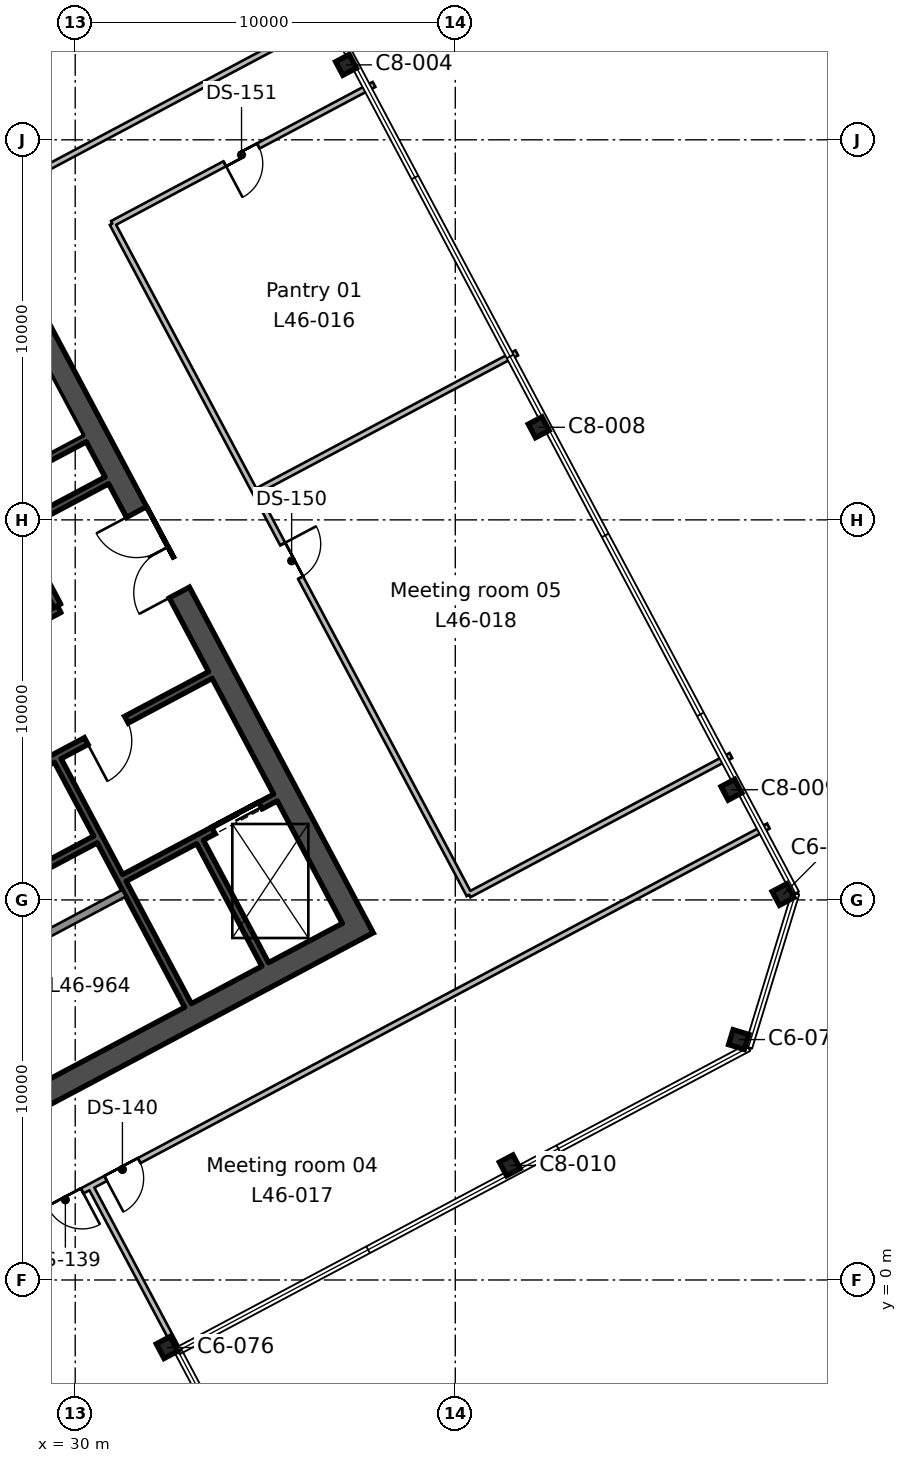
"""IFC4 building model, lengths in metres.
Left out: names, types, materials, properties, quantities, classifications, styles, units other than length and angle.
Written with IfcOpenShell. Run it as: python <this file> out.ifc"""

import sys

from ifc_helpers import new_model, si_unit, direction, frame, frame_2d, origin, origin_2d, place, context, subcontext, project, spatial, rectangle, i_section, extrude, element, fill, save


model = new_model("IFC4")
c1 = context("Model", 3, precision=1e-05, world=origin(), true_north=direction((0.0, 1.0)))
c2 = subcontext(c1, "Body", "Model", "MODEL_VIEW")
j1 = project(units=[si_unit("LENGTHUNIT", "METRE"), si_unit("PLANEANGLEUNIT", "RADIAN")], contexts=[c1])
p1 = place(None, origin())
s1 = spatial("IfcSite", under=j1, at=p1, CompositionType="ELEMENT")
p2 = place(p1, origin())
s2 = spatial("IfcBuilding", under=s1, at=p2, CompositionType="ELEMENT")
p3 = place(p2, frame((0.0, 0.0, 213.0)))
s3 = spatial("IfcBuildingStorey", under=s2, at=p3, CompositionType="ELEMENT", Elevation=213.0)
p4 = place(p3, frame((32.417, -1.777, 0.0), z_axis=(0.0, 0.0, 1.0), x_axis=(0.882947592859, 0.469471562786, 0.0)))
e1 = element("IfcColumn", 1, at=p4, inside=s3, PredefinedType="COLUMN", context=c2, shape_type="SweptSolid", body=[
    extrude(i_section(OverallWidth=0.412, OverallDepth=0.434, WebThickness=0.036, FlangeThickness=0.057, FilletRadius=0.015, at=origin_2d()), origin(), (0.0, 0.0, 1.0), 3.9),
])
p5 = place(p3, frame((41.434, 3.015, 0.0), z_axis=(0.0, 0.0, 1.0), x_axis=(0.882947592859, 0.469471562786, 0.0)))
e2 = element("IfcColumn", 2, at=p5, inside=s3, PredefinedType="COLUMN", context=c2, shape_type="SweptSolid", body=[
    extrude(i_section(OverallWidth=0.404, OverallDepth=0.406, WebThickness=0.027, FlangeThickness=0.044, FilletRadius=0.015, at=origin_2d()), origin(), (0.0, 0.0, 1.0), 3.9),
])
for number, where, z_axis, x_axis in (
    (3, (47.459, 6.326, 0.0), (0.0, 0.0, 1.0), (0.292, 0.956, 0.0)),
    (4, (48.626, 10.142, 0.0), (0.0, 0.0, 1.0), (-0.469, 0.883, 0.0)),
):
    element("IfcColumn", number, at=place(p3, frame(where, z_axis=z_axis, x_axis=x_axis)), inside=s3, PredefinedType="COLUMN", context=c2, shape_type="SweptSolid", body=[
        extrude(i_section(OverallWidth=0.412, OverallDepth=0.434, WebThickness=0.036, FlangeThickness=0.057, FilletRadius=0.015, at=origin_2d()), origin(), (0.0, 0.0, 1.0), 3.9),
    ])
for number, where, z_axis, x_axis in (
    (5, (47.266, 12.9, 0.0), (0.0, 0.0, 1.0), (-0.469, 0.883, 0.0)),
    (6, (42.196, 22.436, 0.0), (0.0, 0.0, 1.0), (-0.469, 0.883, 0.0)),
    (7, (37.126, 31.972, 0.0), (0.0, 0.0, 1.0), (-0.469, 0.883, 0.0)),
):
    element("IfcColumn", number, at=place(p3, frame(where, z_axis=z_axis, x_axis=x_axis)), inside=s3, PredefinedType="COLUMN", context=c2, shape_type="SweptSolid", body=[
        extrude(i_section(OverallWidth=0.404, OverallDepth=0.406, WebThickness=0.027, FlangeThickness=0.044, FilletRadius=0.015, at=origin_2d()), origin(), (0.0, 0.0, 1.0), 3.9),
    ])
p6 = place(p3, frame((37.576, 8.994, 0.0), z_axis=(0.0, 0.0, 1.0), x_axis=(-0.469478769487, 0.88294376095, 0.0)))
e8 = element("IfcWall", 8, at=p6, inside=s3, PredefinedType="SHEAR", context=c2, shape_type="SweptSolid", body=[
    extrude(rectangle(XDim=19.4, YDim=0.6, at=frame_2d((9.7, 0.0))), origin(), (0.0, 0.0, 1.0), 3.9),
])
p7 = place(p6, frame((10.3, 0.0, 0.0)))
e9 = element("IfcOpeningElement", 9, at=p7, cuts=e8, PredefinedType="OPENING", context=c2, shape_type="SweptSolid", body=[
    extrude(rectangle(XDim=2.4, YDim=2.4, at=frame_2d((1.2, 1.2))), frame((0.0, 0.31, 0.0), z_axis=(0.0, -1.0, 0.0), x_axis=(1.0, 0.0, 0.0)), (0.0, 0.0, 1.0), 0.62),
])
p8 = place(p3, frame((19.335, -0.366, 0.0), z_axis=(0.0, 0.0, 1.0), x_axis=(0.88294509198, 0.469476266226, 0.0)))
e10 = element("IfcWall", 10, at=p8, inside=s3, PredefinedType="SHEAR", context=c2, shape_type="SweptSolid", body=[
    extrude(rectangle(XDim=20.2, YDim=0.6, at=frame_2d((10.1, 0.0))), origin(), (0.0, 0.0, 1.0), 3.9),
])
p9 = place(p3, frame((32.968, 7.223, 0.0), z_axis=(0.0, 0.0, 1.0), x_axis=(-0.469480409012, 0.88294288918, 0.0)))
e11 = element("IfcWall", 11, at=p9, inside=s3, PredefinedType="SHEAR", context=c2, shape_type="SweptSolid", body=[
    extrude(rectangle(XDim=7.3, YDim=0.2, at=frame_2d((3.65, 0.0))), origin(), (0.0, 0.0, 1.0), 3.9),
])
p10 = place(p3, frame((29.528, 17.739, 0.0), z_axis=(0.0, 0.0, 1.0), x_axis=(-0.469401318492, 0.882984938828, 0.0)))
e12 = element("IfcWall", 12, at=p10, inside=s3, PredefinedType="SHEAR", context=c2, shape_type="SweptSolid", body=[
    extrude(rectangle(XDim=2.2, YDim=0.2, at=frame_2d((1.1, 0.0))), origin(), (0.0, 0.0, 1.0), 3.9),
])
p11 = place(p3, frame((34.999, 8.303, 0.0), z_axis=(0.0, 0.0, 1.0), x_axis=(-0.4694665462, 0.882950260207, 0.0)))
e13 = element("IfcWall", 13, at=p11, inside=s3, PredefinedType="SHEAR", context=c2, shape_type="SweptSolid", body=[
    extrude(rectangle(XDim=3.65, YDim=0.2, at=frame_2d((1.825, 0.0))), origin(), (0.0, 0.0, 1.0), 3.9),
])
p12 = place(p3, frame((26.692, 7.737, 0.0), z_axis=(0.0, 0.0, 1.0), x_axis=(0.882953967957, 0.469459572775, 0.0)))
e14 = element("IfcWall", 14, at=p12, inside=s3, PredefinedType="SOLIDWALL", context=c2, shape_type="SweptSolid", body=[
    extrude(rectangle(XDim=5.2, YDim=0.2, at=frame_2d((2.6, 0.0))), origin(), (0.0, 0.0, 1.0), 3.9),
])
p13 = place(p3, frame((31.296, 10.581, 0.0), z_axis=(0.0, 0.0, 1.0), x_axis=(0.882960433586, 0.469447412093, 0.0)))
e15 = element("IfcWall", 15, at=p13, inside=s3, PredefinedType="SHEAR", context=c2, shape_type="SweptSolid", body=[
    extrude(rectangle(XDim=4.5, YDim=0.2, at=frame_2d((2.25, 0.0))), origin(), (0.0, 0.0, 1.0), 3.9),
])
p14 = place(p13, frame((2.65, 0.0, 0.0)))
e16 = element("IfcOpeningElement", 16, at=p14, cuts=e15, PredefinedType="OPENING", context=c2, shape_type="SweptSolid", body=[
    extrude(rectangle(XDim=1.4, YDim=2.4, at=frame_2d((0.7, 1.2))), frame((0.0, 0.11, 0.0), z_axis=(0.0, -1.0, 0.0), x_axis=(1.0, 0.0, 0.0)), (0.0, 0.0, 1.0), 0.22),
])
p15 = place(p3, frame((25.941, 9.15, 0.0), z_axis=(0.0, 0.0, 1.0), x_axis=(0.882953967957, 0.469459572775, 0.0)))
e17 = element("IfcWall", 17, at=p15, inside=s3, PredefinedType="SHEAR", context=c2, shape_type="SweptSolid", body=[
    extrude(rectangle(XDim=5.2, YDim=0.2, at=frame_2d((2.6, 0.0))), origin(), (0.0, 0.0, 1.0), 3.9),
])
p16 = place(p3, frame((24.726, 11.222, 0.0), z_axis=(0.0, 0.0, 1.0), x_axis=(0.882940221191, 0.469485426614, 0.0)))
e18 = element("IfcWall", 18, at=p16, inside=s3, PredefinedType="SHEAR", context=c2, shape_type="SweptSolid", body=[
    extrude(rectangle(XDim=10.0, YDim=0.2, at=frame_2d((5.0, 0.0))), origin(), (0.0, 0.0, 1.0), 3.9),
])
p17 = place(p16, frame((6.3, 0.0, 0.0)))
e19 = element("IfcOpeningElement", 19, at=p17, cuts=e18, PredefinedType="OPENING", context=c2, shape_type="SweptSolid", body=[
    extrude(rectangle(XDim=1.2, YDim=2.1, at=frame_2d((0.6, 1.05))), frame((0.0, 0.11, 0.0), z_axis=(0.0, -1.0, 0.0), x_axis=(1.0, 0.0, 0.0)), (0.0, 0.0, 1.0), 0.22),
])
p18 = place(p16, frame((0.36, 0.0, 0.0)))
e20 = element("IfcOpeningElement", 20, at=p18, cuts=e18, PredefinedType="OPENING", context=c2, shape_type="SweptSolid", body=[
    extrude(rectangle(XDim=0.9, YDim=2.1, at=frame_2d((0.45, 1.05))), frame((0.0, 0.11, 0.0), z_axis=(0.0, -1.0, 0.0), x_axis=(1.0, 0.0, 0.0)), (0.0, 0.0, 1.0), 0.22),
])
p19 = place(p16, frame((3.06, 0.0, 0.0)))
e21 = element("IfcOpeningElement", 21, at=p19, cuts=e18, PredefinedType="OPENING", context=c2, shape_type="SweptSolid", body=[
    extrude(rectangle(XDim=0.9, YDim=2.1, at=frame_2d((0.45, 1.05))), frame((0.0, 0.11, 0.0), z_axis=(0.0, -1.0, 0.0), x_axis=(1.0, 0.0, 0.0)), (0.0, 0.0, 1.0), 0.22),
])
p20 = place(p3, frame((24.807, 15.116, 0.0), z_axis=(0.0, 0.0, 1.0), x_axis=(0.882942972946, 0.469480251476, 0.0)))
e22 = element("IfcWall", 22, at=p20, inside=s3, PredefinedType="SHEAR", context=c2, shape_type="SweptSolid", body=[
    extrude(rectangle(XDim=5.4, YDim=0.2, at=frame_2d((2.7, 0.0))), origin(), (0.0, 0.0, 1.0), 3.9),
])
p21 = place(p20, frame((0.36, 0.0, 0.0)))
e23 = element("IfcOpeningElement", 23, at=p21, cuts=e22, PredefinedType="OPENING", context=c2, shape_type="SweptSolid", body=[
    extrude(rectangle(XDim=0.9, YDim=2.1, at=frame_2d((0.45, 1.05))), frame((0.0, 0.11, 0.0), z_axis=(0.0, -1.0, 0.0), x_axis=(1.0, 0.0, 0.0)), (0.0, 0.0, 1.0), 0.22),
])
p22 = place(p20, frame((3.06, 0.0, 0.0)))
e24 = element("IfcOpeningElement", 24, at=p22, cuts=e22, PredefinedType="OPENING", context=c2, shape_type="SweptSolid", body=[
    extrude(rectangle(XDim=0.9, YDim=2.1, at=frame_2d((0.45, 1.05))), frame((0.0, 0.11, 0.0), z_axis=(0.0, -1.0, 0.0), x_axis=(1.0, 0.0, 0.0)), (0.0, 0.0, 1.0), 0.22),
])
p23 = place(p3, frame((23.769, 17.282, 0.0), z_axis=(0.0, 0.0, 1.0), x_axis=(0.882940221191, 0.469485426614, 0.0)))
e25 = element("IfcWall", 25, at=p23, inside=s3, PredefinedType="SHEAR", context=c2, shape_type="SweptSolid", body=[
    extrude(rectangle(XDim=8.0, YDim=0.2, at=frame_2d((4.0, 0.0))), origin(), (0.0, 0.0, 1.0), 3.9),
])
p24 = place(p3, frame((23.182, 18.385, 0.0), z_axis=(0.0, 0.0, 1.0), x_axis=(0.88295287151, 0.469461634952, 0.0)))
e26 = element("IfcWall", 26, at=p24, inside=s3, PredefinedType="SHEAR", context=c2, shape_type="SweptSolid", body=[
    extrude(rectangle(XDim=8.0, YDim=0.2, at=frame_2d((4.0, 0.0))), origin(), (0.0, 0.0, 1.0), 3.9),
])
p25 = place(p3, frame((0.0, 13.704, 0.0), z_axis=(0.0, 0.0, 1.0), x_axis=(0.882937043325, 0.469491403036, 0.0)))
e27 = element("IfcWall", 27, at=p25, inside=s3, PredefinedType="PARTITIONING", context=c2, shape_type="SweptSolid", body=[
    extrude(rectangle(XDim=41.766, YDim=0.15, at=frame_2d((20.883, 0.0))), origin(), (0.0, 0.0, 1.0), 3.54),
])
p26 = place(p25, frame((19.95, 0.0, 0.0)))
e28 = element("IfcOpeningElement", 28, at=p26, cuts=e27, PredefinedType="OPENING", context=c2, shape_type="SweptSolid", body=[
    extrude(rectangle(XDim=1.8, YDim=2.1, at=frame_2d((0.9, 1.05))), frame((0.0, 0.085, 0.0), z_axis=(0.0, -1.0, 0.0), x_axis=(1.0, 0.0, 0.0)), (0.0, 0.0, 1.0), 0.17),
])
p27 = place(p25, frame((10.35, 0.0, 0.0)))
e29 = element("IfcOpeningElement", 29, at=p27, cuts=e27, PredefinedType="OPENING", context=c2, shape_type="SweptSolid", body=[
    extrude(rectangle(XDim=1.0, YDim=2.1, at=frame_2d((0.5, 1.05))), frame((0.0, 0.085, 0.0), z_axis=(0.0, -1.0, 0.0), x_axis=(1.0, 0.0, 0.0)), (0.0, 0.0, 1.0), 0.17),
])
p28 = place(p3, frame((48.239, 11.944, 0.0), z_axis=(0.0, 0.0, 1.0), x_axis=(-0.882956533409, -0.469454747671, 0.0)))
e30 = element("IfcWall", 30, at=p28, inside=s3, PredefinedType="PARTITIONING", context=c2, shape_type="SweptSolid", body=[
    extrude(rectangle(XDim=39.231, YDim=0.15, at=frame_2d((19.615, 0.0))), origin(), (0.0, 0.0, 1.0), 3.54),
])
p29 = place(p28, frame((20.45, 0.0, 0.0)))
e31 = element("IfcOpeningElement", 31, at=p29, cuts=e30, PredefinedType="OPENING", context=c2, shape_type="SweptSolid", body=[
    extrude(rectangle(XDim=1.0, YDim=2.1, at=frame_2d((0.5, 1.05))), frame((0.0, 0.085, 0.0), z_axis=(0.0, -1.0, 0.0), x_axis=(1.0, 0.0, 0.0)), (0.0, 0.0, 1.0), 0.17),
])
p30 = place(p28, frame((18.75, 0.0, 0.0)))
e32 = element("IfcOpeningElement", 32, at=p30, cuts=e30, PredefinedType="OPENING", context=c2, shape_type="SweptSolid", body=[
    extrude(rectangle(XDim=1.0, YDim=2.1, at=frame_2d((0.5, 1.05))), frame((0.0, 0.085, 0.0), z_axis=(0.0, -1.0, 0.0), x_axis=(1.0, 0.0, 0.0)), (0.0, 0.0, 1.0), 0.17),
])
p31 = place(p3, frame((30.403, 2.462, 0.0), z_axis=(0.0, 0.0, 1.0), x_axis=(0.469519202187, -0.882922260891, 0.0)))
e33 = element("IfcWall", 33, at=p31, inside=s3, PredefinedType="PARTITIONING", context=c2, shape_type="SweptSolid", body=[
    extrude(rectangle(XDim=5.182, YDim=0.15, at=frame_2d((2.591, 0.0))), origin(), (0.0, 0.0, 1.0), 3.54),
])
p32 = place(p3, frame((37.864, 31.458, 0.0), z_axis=(0.0, 0.0, 1.0), x_axis=(-0.882962098673, -0.4694442803, 0.0)))
e34 = element("IfcWall", 34, at=p32, inside=s3, PredefinedType="PARTITIONING", context=c2, shape_type="SweptSolid", body=[
    extrude(rectangle(XDim=7.801, YDim=0.15, at=frame_2d((3.9, 0.0))), origin(), (0.0, 0.0, 1.0), 3.54),
])
p33 = place(p32, frame((3.45, 0.0, 0.0)))
e35 = element("IfcOpeningElement", 35, at=p33, cuts=e34, PredefinedType="OPENING", context=c2, shape_type="SweptSolid", body=[
    extrude(rectangle(XDim=1.0, YDim=2.1, at=frame_2d((0.5, 1.05))), frame((0.0, 0.085, 0.0), z_axis=(0.0, -1.0, 0.0), x_axis=(1.0, 0.0, 0.0)), (0.0, 0.0, 1.0), 0.17),
])
p34 = place(p3, frame((30.976, 27.796, 0.0), z_axis=(0.0, 0.0, 1.0), x_axis=(0.469489882812, -0.882937851685, 0.0)))
e36 = element("IfcWall", 36, at=p34, inside=s3, PredefinedType="PARTITIONING", context=c2, shape_type="SweptSolid", body=[
    extrude(rectangle(XDim=20.0, YDim=0.15, at=frame_2d((10.0, 0.0))), origin(), (0.0, 0.0, 1.0), 3.54),
])
p35 = place(p34, frame((9.55, 0.0, 0.0)))
e37 = element("IfcOpeningElement", 37, at=p35, cuts=e36, PredefinedType="OPENING", context=c2, shape_type="SweptSolid", body=[
    extrude(rectangle(XDim=1.0, YDim=2.1, at=frame_2d((0.5, 1.05))), frame((0.0, 0.085, 0.0), z_axis=(0.0, -1.0, 0.0), x_axis=(1.0, 0.0, 0.0)), (0.0, 0.0, 1.0), 0.17),
])
p36 = place(p3, frame((40.366, 10.137, 0.0), z_axis=(0.0, 0.0, 1.0), x_axis=(0.882934506056, 0.469496174655, 0.0)))
e38 = element("IfcWall", 38, at=p36, inside=s3, PredefinedType="PARTITIONING", context=c2, shape_type="SweptSolid", body=[
    extrude(rectangle(XDim=7.8, YDim=0.15, at=frame_2d((3.9, 0.0))), origin(), (0.0, 0.0, 1.0), 3.54),
])
p37 = place(p3, frame((41.619, 24.395, 0.0), z_axis=(0.0, 0.0, 1.0), x_axis=(-0.882882604432, -0.469593767837, 0.0)))
e39 = element("IfcWall", 39, at=p37, inside=s3, PredefinedType="PARTITIONING", context=c2, shape_type="SweptSolid", body=[
    extrude(rectangle(XDim=7.801, YDim=0.15, at=frame_2d((3.9, 0.0))), origin(), (0.0, 0.0, 1.0), 3.54),
])
p38 = place(p7, origin())
e40 = element("IfcDoor", 40, at=p38, inside=s3, OperationType="DOUBLE_DOOR_SINGLE_SWING", PredefinedType="DOOR", context=c2, shape_type="SweptSolid", body=[
    extrude(rectangle(XDim=2.4, YDim=2.4, at=frame_2d((1.2, 1.2))), frame((0.0, 0.025, 0.0), z_axis=(0.0, -1.0, 0.0), x_axis=(1.0, 0.0, 0.0)), (0.0, 0.0, 1.0), 0.05),
])
fill(e9, e40)
p39 = place(p17, frame((1.2, 0.0, 0.0), z_axis=(0.0, 0.0, 1.0), x_axis=(-1.0, 0.0, 0.0)))
e41 = element("IfcDoor", 41, at=p39, inside=s3, OperationType="SINGLE_SWING_RIGHT", PredefinedType="DOOR", context=c2, shape_type="SweptSolid", body=[
    extrude(rectangle(XDim=1.2, YDim=2.1, at=frame_2d((0.6, 1.05))), frame((0.0, 0.025, 0.0), z_axis=(0.0, -1.0, 0.0), x_axis=(1.0, 0.0, 0.0)), (0.0, 0.0, 1.0), 0.05),
])
fill(e19, e41)
p40 = place(p14, origin())
e42 = element("IfcDoor", 42, at=p40, inside=s3, OperationType="DOUBLE_DOOR_SLIDING", PredefinedType="DOOR", context=c2, shape_type="SweptSolid", body=[
    extrude(rectangle(XDim=1.4, YDim=2.4, at=frame_2d((0.7, 1.2))), frame((0.0, 0.025, 0.0), z_axis=(0.0, -1.0, 0.0), x_axis=(1.0, 0.0, 0.0)), (0.0, 0.0, 1.0), 0.05),
])
fill(e16, e42)
p41 = place(p29, origin())
e43 = element("IfcDoor", 43, at=p41, inside=s3, OperationType="SINGLE_SWING_LEFT", PredefinedType="DOOR", context=c2, shape_type="SweptSolid", body=[
    extrude(rectangle(XDim=1.0, YDim=2.1, at=frame_2d((0.5, 1.05))), frame((0.0, 0.025, 0.0), z_axis=(0.0, -1.0, 0.0), x_axis=(1.0, 0.0, 0.0)), (0.0, 0.0, 1.0), 0.05),
])
fill(e31, e43)
p42 = place(p30, origin())
e44 = element("IfcDoor", 44, at=p42, inside=s3, OperationType="SINGLE_SWING_RIGHT", PredefinedType="DOOR", context=c2, shape_type="SweptSolid", body=[
    extrude(rectangle(XDim=1.0, YDim=2.1, at=frame_2d((0.5, 1.05))), frame((0.0, 0.025, 0.0), z_axis=(0.0, -1.0, 0.0), x_axis=(1.0, 0.0, 0.0)), (0.0, 0.0, 1.0), 0.05),
])
fill(e32, e44)
p43 = place(p35, origin())
e45 = element("IfcDoor", 45, at=p43, inside=s3, OperationType="SINGLE_SWING_LEFT", PredefinedType="DOOR", context=c2, shape_type="SweptSolid", body=[
    extrude(rectangle(XDim=1.0, YDim=2.1, at=frame_2d((0.5, 1.05))), frame((0.0, 0.025, 0.0), z_axis=(0.0, -1.0, 0.0), x_axis=(1.0, 0.0, 0.0)), (0.0, 0.0, 1.0), 0.05),
])
fill(e37, e45)
p44 = place(p33, origin())
e46 = element("IfcDoor", 46, at=p44, inside=s3, OperationType="SINGLE_SWING_RIGHT", PredefinedType="DOOR", context=c2, shape_type="SweptSolid", body=[
    extrude(rectangle(XDim=1.0, YDim=2.1, at=frame_2d((0.5, 1.05))), frame((0.0, 0.025, 0.0), z_axis=(0.0, -1.0, 0.0), x_axis=(1.0, 0.0, 0.0)), (0.0, 0.0, 1.0), 0.05),
])
fill(e35, e46)
save(model, sys.argv[1])
